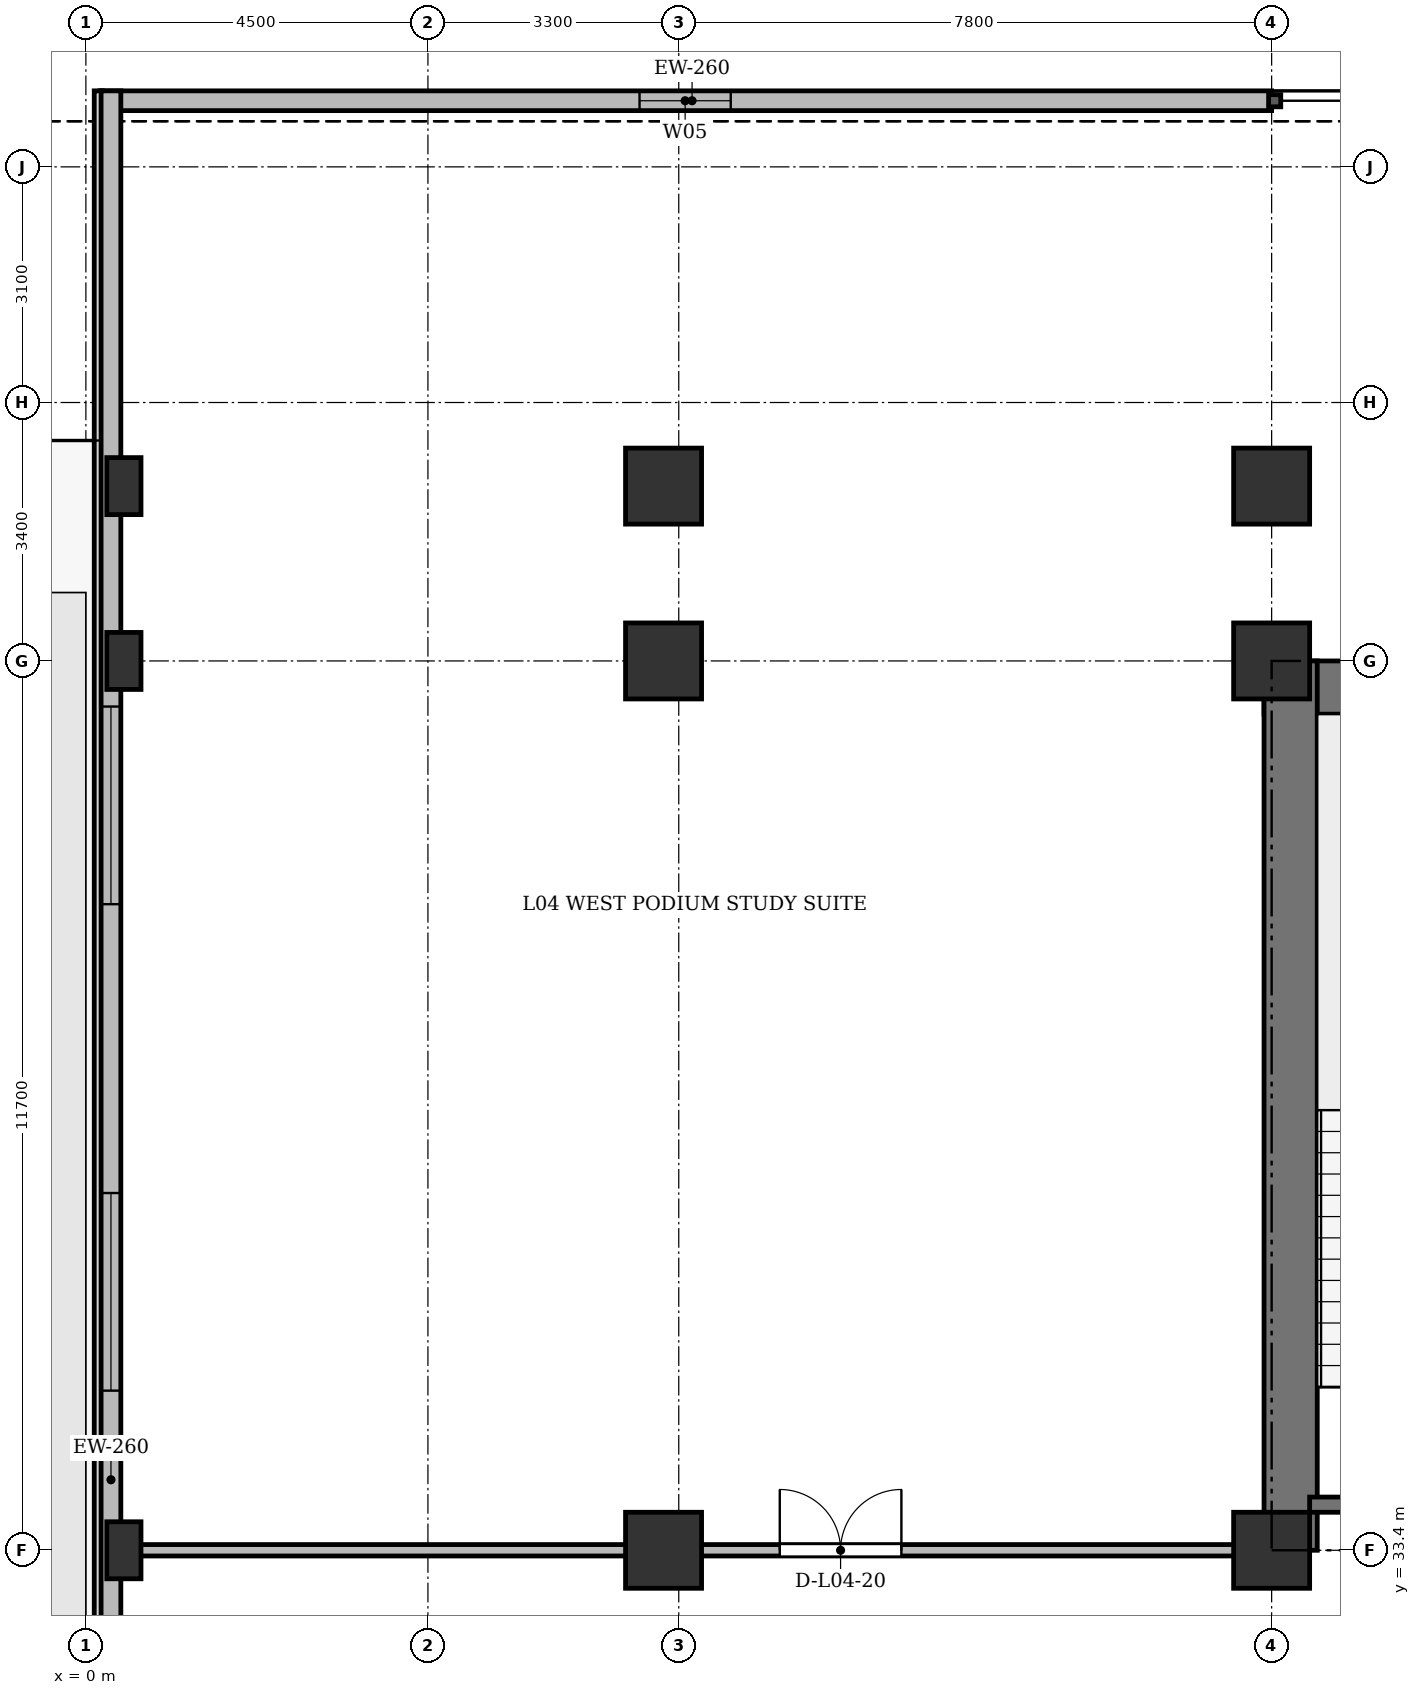
"""IFC4 building model, lengths in metres.
Left out: names, types, materials, properties, quantities, classifications, styles, units other than length and angle.
Written with IfcOpenShell. Run it as: python <this file> out.ifc"""

import sys

from ifc_helpers import new_model, si_unit, direction, frame, frame_2d, origin, origin_2d, place, context, subcontext, project, spatial, rectangle, extrude, source, transform, mapped, element, fill, save


model = new_model("IFC4")
c1 = context("Model", 3, precision=1e-05, world=origin(), true_north=direction((0.0, 1.0)))
c2 = subcontext(c1, "Body", "Model", "MODEL_VIEW")
j1 = project(units=[si_unit("LENGTHUNIT", "METRE"), si_unit("PLANEANGLEUNIT", "RADIAN")], contexts=[c1])
p1 = place(None, origin())
s1 = spatial("IfcSite", under=j1, at=p1, CompositionType="ELEMENT")
p2 = place(p1, origin())
s2 = spatial("IfcBuilding", under=s1, at=p2, CompositionType="ELEMENT")
p3 = place(p2, frame((0.0, 0.0, 18.7)))
s3 = spatial("IfcBuildingStorey", under=s2, at=p3, CompositionType="ELEMENT", Elevation=18.7)
m1 = source(origin(), c2, "Body", "SweptSolid", [
    extrude(rectangle(XDim=0.45, YDim=0.75, at=origin_2d()), origin(), (0.0, 0.0, 1.0), 4.8),
])
for number, where, z_axis, x_axis in (
    (1, (0.5, 33.4, 0.0), (0.0, 0.0, 1.0), (1.0, 0.0, 0.0)),
    (2, (0.5, 45.1, 0.0), (0.0, 0.0, 1.0), (1.0, 0.0, 0.0)),
    (3, (0.5, 47.4, 0.0), (0.0, 0.0, 1.0), (1.0, 0.0, 0.0)),
):
    element("IfcColumn", number, at=place(p3, frame(where, z_axis=z_axis, x_axis=x_axis)), inside=s3, PredefinedType="PILASTER", context=c2, shape_type="MappedRepresentation", body=[
        mapped(m1, transform((0.0, 0.0, 0.0), x_axis=(1.0, 0.0, 0.0), y_axis=(0.0, 1.0, 0.0), z_axis=(0.0, 0.0, 1.0), scale=1.0)),
    ])
m2 = source(origin(), c2, "Body", "SweptSolid", [
    extrude(rectangle(XDim=1.0, YDim=1.0, at=origin_2d()), origin(), (0.0, 0.0, 1.0), 4.8),
])
for number, where, z_axis, x_axis in (
    (4, (7.6, 33.4, 0.0), (0.0, 0.0, 1.0), (1.0, 0.0, 0.0)),
    (5, (7.6, 45.1, 0.0), (0.0, 0.0, 1.0), (1.0, 0.0, 0.0)),
    (6, (7.6, 47.4, 0.0), (0.0, 0.0, 1.0), (1.0, 0.0, 0.0)),
    (7, (15.6, 33.4, 0.0), (0.0, 0.0, 1.0), (1.0, 0.0, 0.0)),
    (8, (15.6, 45.1, 0.0), (0.0, 0.0, 1.0), (1.0, 0.0, 0.0)),
    (9, (15.6, 47.4, 0.0), (0.0, 0.0, 1.0), (1.0, 0.0, 0.0)),
):
    element("IfcColumn", number, at=place(p3, frame(where, z_axis=z_axis, x_axis=x_axis)), inside=s3, PredefinedType="COLUMN", context=c2, shape_type="MappedRepresentation", body=[
        mapped(m2, transform((0.0, 0.0, 0.0), x_axis=(1.0, 0.0, 0.0), y_axis=(0.0, 1.0, 0.0), z_axis=(0.0, 0.0, 1.0), scale=1.0)),
    ])
p4 = place(p3, frame((0.35, 52.47, 0.0), z_axis=(0.0, 0.0, 1.0), x_axis=(1.0, 0.0, 0.0)))
e10 = element("IfcWall", 10, at=p4, inside=s3, PredefinedType="SOLIDWALL", context=c2, shape_type="SweptSolid", body=[
    extrude(rectangle(XDim=15.25, YDim=0.26, at=frame_2d((7.625, 0.0))), origin(), (0.0, 0.0, 1.0), 4.42),
])
p5 = place(p4, frame((6.934, 0.0, 0.9)))
e11 = element("IfcOpeningElement", 11, at=p5, cuts=e10, PredefinedType="OPENING", context=c2, shape_type="SweptSolid", body=[
    extrude(rectangle(XDim=1.2, YDim=1.65, at=frame_2d((0.6, 0.825))), frame((0.0, 0.14, 0.0), z_axis=(0.0, -1.0, 0.0), x_axis=(1.0, 0.0, 0.0)), (0.0, 0.0, 1.0), 0.28),
])
p6 = place(p3, frame((0.33, 1.6, 0.0), z_axis=(0.0, 0.0, 1.0), x_axis=(0.0, 1.0, 0.0)))
e12 = element("IfcWall", 12, at=p6, inside=s3, PredefinedType="SOLIDWALL", context=c2, shape_type="SweptSolid", body=[
    extrude(rectangle(XDim=51.0, YDim=0.26, at=frame_2d((25.5, 0.0))), origin(), (0.0, 0.0, 1.0), 2.62),
])
p7 = place(p6, frame((12.655, 0.0, 0.0)))
e13 = element("IfcOpeningElement", 13, at=p7, cuts=e12, PredefinedType="OPENING", context=c2, shape_type="SweptSolid", body=[
    extrude(rectangle(XDim=1.5, YDim=2.25, at=frame_2d((0.75, 1.125))), frame((0.0, 0.14, 0.0), z_axis=(0.0, -1.0, 0.0), x_axis=(1.0, 0.0, 0.0)), (0.0, 0.0, 1.0), 0.28),
])
p8 = place(p6, frame((3.6, 0.0, 0.92)))
e14 = element("IfcOpeningElement", 14, at=p8, cuts=e12, PredefinedType="OPENING", context=c2, shape_type="SweptSolid", body=[
    extrude(rectangle(XDim=2.6, YDim=1.6, at=frame_2d((1.3, 0.8))), frame((0.0, 0.14, 0.0), z_axis=(0.0, -1.0, 0.0), x_axis=(1.0, 0.0, 0.0)), (0.0, 0.0, 1.0), 0.28),
])
p9 = place(p6, frame((17.6, 0.0, 0.92)))
e15 = element("IfcOpeningElement", 15, at=p9, cuts=e12, PredefinedType="OPENING", context=c2, shape_type="SweptSolid", body=[
    extrude(rectangle(XDim=2.6, YDim=1.6, at=frame_2d((1.3, 0.8))), frame((0.0, 0.14, 0.0), z_axis=(0.0, -1.0, 0.0), x_axis=(1.0, 0.0, 0.0)), (0.0, 0.0, 1.0), 0.28),
])
p10 = place(p6, frame((33.9, 0.0, 0.92)))
e16 = element("IfcOpeningElement", 16, at=p10, cuts=e12, PredefinedType="OPENING", context=c2, shape_type="SweptSolid", body=[
    extrude(rectangle(XDim=2.6, YDim=1.6, at=frame_2d((1.3, 0.8))), frame((0.0, 0.14, 0.0), z_axis=(0.0, -1.0, 0.0), x_axis=(1.0, 0.0, 0.0)), (0.0, 0.0, 1.0), 0.28),
])
p11 = place(p6, frame((40.3, 0.0, 0.92)))
e17 = element("IfcOpeningElement", 17, at=p11, cuts=e12, PredefinedType="OPENING", context=c2, shape_type="SweptSolid", body=[
    extrude(rectangle(XDim=2.6, YDim=1.6, at=frame_2d((1.3, 0.8))), frame((0.0, 0.14, 0.0), z_axis=(0.0, -1.0, 0.0), x_axis=(1.0, 0.0, 0.0)), (0.0, 0.0, 1.0), 0.28),
])
p12 = place(p3, frame((15.5, 44.75, 0.0), z_axis=(0.0, 0.0, 1.0), x_axis=(1.0, 0.0, 0.0)))
e18 = element("IfcWall", 18, at=p12, inside=s3, PredefinedType="SHEAR", context=c2, shape_type="SweptSolid", body=[
    extrude(rectangle(XDim=43.4, YDim=0.7, at=frame_2d((21.7, 0.0))), origin(), (0.0, 0.0, 1.0), 4.42),
])
p13 = place(p3, frame((15.85, 33.4, 0.0), z_axis=(0.0, 0.0, 1.0), x_axis=(0.0, 1.0, 0.0)))
e19 = element("IfcWall", 19, at=p13, inside=s3, PredefinedType="SHEAR", context=c2, shape_type="SweptSolid", body=[
    extrude(rectangle(XDim=11.7, YDim=0.7, at=frame_2d((5.85, 0.0))), origin(), (0.0, 0.0, 1.0), 4.42),
])
p14 = place(p3, frame((16.1, 34.0, 0.0), z_axis=(0.0, 0.0, 1.0), x_axis=(1.0, 0.0, 0.0)))
e20 = element("IfcWall", 20, at=p14, inside=s3, PredefinedType="SHEAR", context=c2, shape_type="SweptSolid", body=[
    extrude(rectangle(XDim=3.4, YDim=0.2, at=frame_2d((1.7, 0.0))), origin(), (0.0, 0.0, 1.0), 4.42),
])
p15 = place(p3, frame((0.45, 33.4, 0.0), z_axis=(0.0, 0.0, 1.0), x_axis=(1.0, 0.0, 0.0)))
e21 = element("IfcWall", 21, at=p15, inside=s3, PredefinedType="PARTITIONING", context=c2, shape_type="SweptSolid", body=[
    extrude(rectangle(XDim=15.35, YDim=0.15, at=frame_2d((7.675, 0.0))), origin(), (0.0, 0.0, 1.0), 2.62),
])
p16 = place(p15, frame((8.679, 0.0, 0.0)))
e22 = element("IfcOpeningElement", 22, at=p16, cuts=e21, PredefinedType="OPENING", context=c2, shape_type="SweptSolid", body=[
    extrude(rectangle(XDim=1.6, YDim=2.2, at=frame_2d((0.8, 1.1))), frame((0.0, 0.085, 0.0), z_axis=(0.0, -1.0, 0.0), x_axis=(1.0, 0.0, 0.0)), (0.0, 0.0, 1.0), 0.17),
])
m3 = source(origin(), c2, "Body", "SweptSolid", [
    extrude(rectangle(XDim=1.2, YDim=1.65, at=frame_2d((0.6, 0.825))), frame((0.0, 0.03, 0.0), z_axis=(0.0, -1.0, 0.0), x_axis=(1.0, 0.0, 0.0)), (0.0, 0.0, 1.0), 0.06),
])
p17 = place(p5, origin())
e23 = element("IfcWindow", 23, at=p17, inside=s3, PartitioningType="SINGLE_PANEL", PredefinedType="WINDOW", context=c2, shape_type="MappedRepresentation", body=[
    mapped(m3, transform((0.0, 0.0, 0.0), x_axis=(1.0, 0.0, 0.0), y_axis=(0.0, 1.0, 0.0), z_axis=(0.0, 0.0, 1.0), scale=1.0)),
])
fill(e11, e23)
m4 = source(origin(), c2, "Body", "SweptSolid", [
    extrude(rectangle(XDim=2.6, YDim=1.6, at=frame_2d((1.3, 0.8))), frame((0.0, 0.03, 0.0), z_axis=(0.0, -1.0, 0.0), x_axis=(1.0, 0.0, 0.0)), (0.0, 0.0, 1.0), 0.06),
])
p18 = place(p10, origin())
e24 = element("IfcWindow", 24, at=p18, inside=s3, PartitioningType="SINGLE_PANEL", PredefinedType="WINDOW", context=c2, shape_type="MappedRepresentation", body=[
    mapped(m4, transform((0.0, 0.0, 0.0), x_axis=(1.0, 0.0, 0.0), y_axis=(0.0, 1.0, 0.0), z_axis=(0.0, 0.0, 1.0), scale=1.0)),
])
fill(e16, e24)
p19 = place(p11, origin())
e25 = element("IfcWindow", 25, at=p19, inside=s3, PartitioningType="SINGLE_PANEL", PredefinedType="WINDOW", context=c2, shape_type="MappedRepresentation", body=[
    mapped(m4, transform((0.0, 0.0, 0.0), x_axis=(1.0, 0.0, 0.0), y_axis=(0.0, 1.0, 0.0), z_axis=(0.0, 0.0, 1.0), scale=1.0)),
])
fill(e17, e25)
m5 = source(origin(), c2, "Body", "SweptSolid", [
    extrude(rectangle(XDim=1.6, YDim=2.2, at=frame_2d((0.8, 1.1))), frame((0.0, 0.025, 0.0), z_axis=(0.0, -1.0, 0.0), x_axis=(1.0, 0.0, 0.0)), (0.0, 0.0, 1.0), 0.05),
])
p20 = place(p16, origin())
e26 = element("IfcDoor", 26, at=p20, inside=s3, OperationType="DOUBLE_DOOR_SINGLE_SWING", PredefinedType="DOOR", context=c2, shape_type="MappedRepresentation", body=[
    mapped(m5, transform((0.0, 0.0, 0.0), x_axis=(1.0, 0.0, 0.0), y_axis=(0.0, 1.0, 0.0), z_axis=(0.0, 0.0, 1.0), scale=1.0)),
])
fill(e22, e26)
save(model, sys.argv[1])
